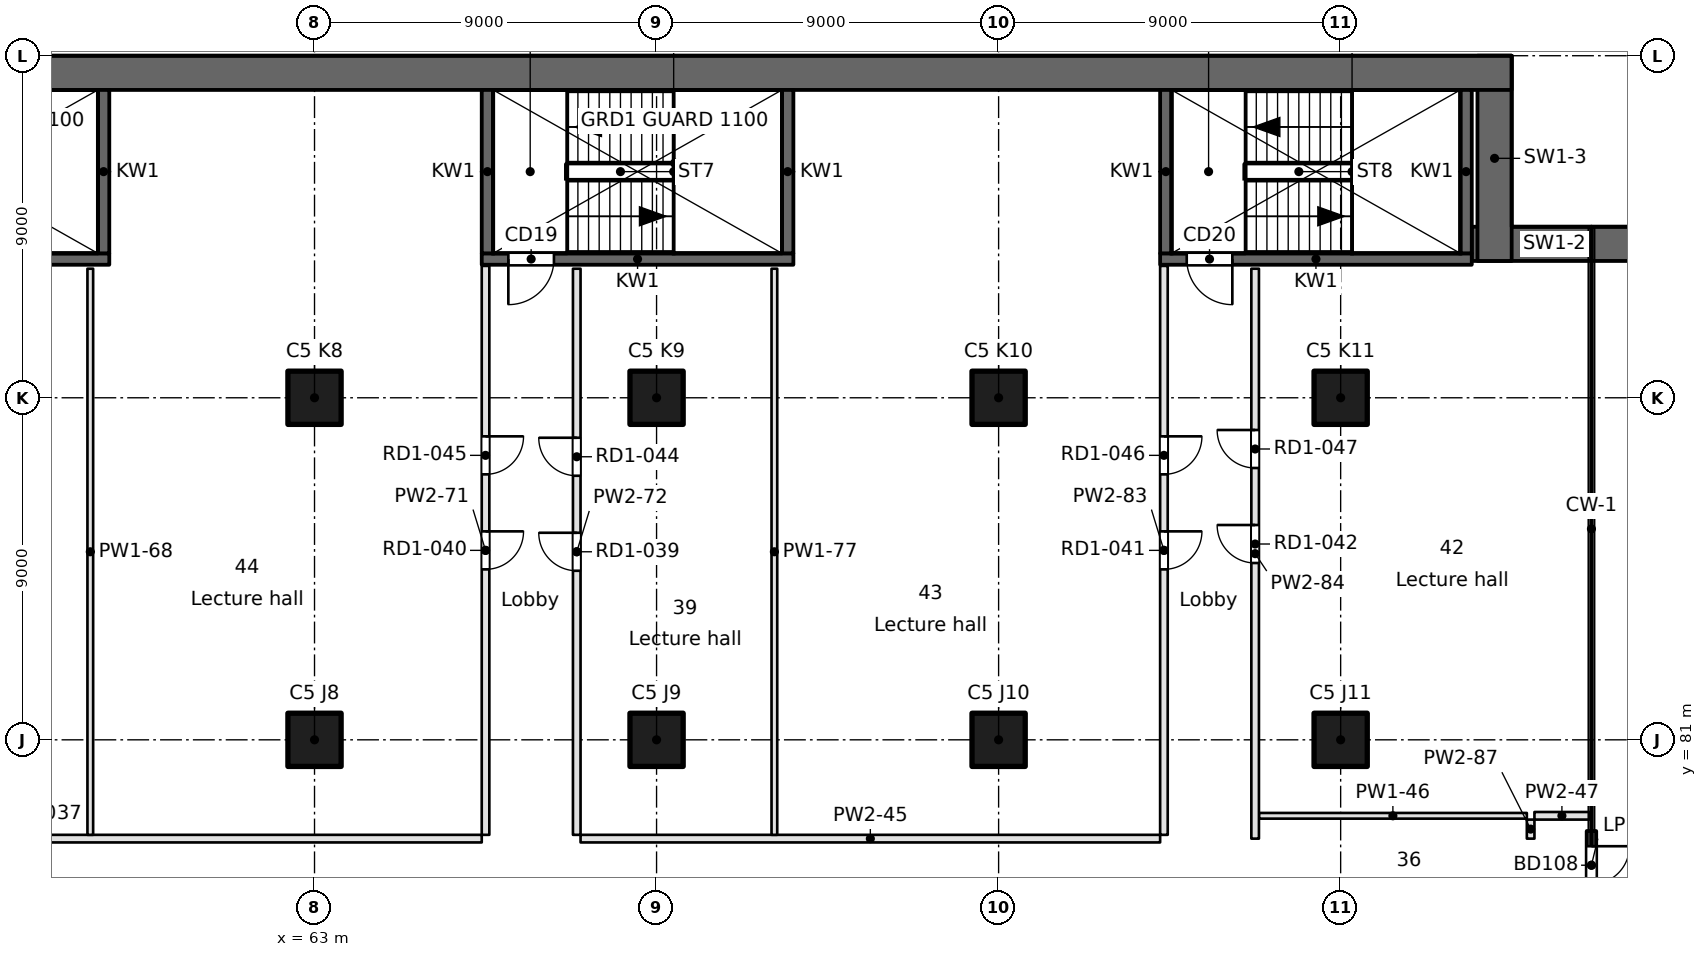
"""IFC4 building model, lengths in metres.
Left out: names, types, materials, properties, quantities, classifications, styles, units other than length and angle.
Written with IfcOpenShell. Run it as: python <this file> out.ifc"""

import sys

from ifc_helpers import new_model, si_unit, direction, frame, frame_2d, origin, origin_2d, place, context, subcontext, project, spatial, rectangle, extrude, element, fill, save


model = new_model("IFC4")
c1 = context("Model", 3, precision=1e-05, world=origin(), true_north=direction((0.0, 1.0)))
c2 = subcontext(c1, "Body", "Model", "MODEL_VIEW")
j1 = project(units=[si_unit("LENGTHUNIT", "METRE"), si_unit("PLANEANGLEUNIT", "RADIAN")], contexts=[c1])
p1 = place(None, origin())
s1 = spatial("IfcSite", under=j1, at=p1, CompositionType="ELEMENT")
p2 = place(p1, origin())
s2 = spatial("IfcBuilding", under=s1, at=p2, CompositionType="ELEMENT")
p3 = place(p2, frame((0.0, 0.0, 65.4)))
s3 = spatial("IfcBuildingStorey", under=s2, at=p3, CompositionType="ELEMENT", Elevation=65.4)
for number, where, z_axis, x_axis in (
    (1, (63.0, 81.0, 0.0), (0.0, 0.0, 1.0), (1.0, 0.0, 0.0)),
    (2, (63.0, 90.0, 0.0), (0.0, 0.0, 1.0), (1.0, 0.0, 0.0)),
    (3, (72.0, 81.0, 0.0), (0.0, 0.0, 1.0), (1.0, 0.0, 0.0)),
    (4, (72.0, 90.0, 0.0), (0.0, 0.0, 1.0), (1.0, 0.0, 0.0)),
    (5, (81.0, 81.0, 0.0), (0.0, 0.0, 1.0), (1.0, 0.0, 0.0)),
    (6, (81.0, 90.0, 0.0), (0.0, 0.0, 1.0), (1.0, 0.0, 0.0)),
    (7, (90.0, 81.0, 0.0), (0.0, 0.0, 1.0), (1.0, 0.0, 0.0)),
    (8, (90.0, 90.0, 0.0), (0.0, 0.0, 1.0), (1.0, 0.0, 0.0)),
):
    element("IfcColumn", number, at=place(p3, frame(where, z_axis=z_axis, x_axis=x_axis)), inside=s3, PredefinedType="COLUMN", context=c2, shape_type="SweptSolid", body=[
        extrude(rectangle(XDim=1.4, YDim=1.4, at=origin_2d()), origin(), (0.0, 0.0, 1.0), 3.7),
    ])
p4 = place(p3, frame((97.8, 94.05, 0.0), z_axis=(0.0, 0.0, 1.0), x_axis=(-1.0, 0.0, 0.0)))
e9 = element("IfcWall", 9, at=p4, inside=s3, PredefinedType="SHEAR", context=c2, shape_type="SweptSolid", body=[
    extrude(rectangle(XDim=4.351, YDim=0.9, at=frame_2d((2.175, 0.0))), origin(), (0.0, 0.0, 1.0), 3.7),
])
p5 = place(p3, frame((94.05, 93.6, 0.0), z_axis=(0.0, 0.0, 1.0), x_axis=(0.0, 1.0, 0.0)))
e10 = element("IfcWall", 10, at=p5, inside=s3, PredefinedType="SHEAR", context=c2, shape_type="SweptSolid", body=[
    extrude(rectangle(XDim=5.4, YDim=0.9, at=frame_2d((2.7, 0.0))), origin(), (0.0, 0.0, 1.0), 3.7),
])
p6 = place(p3, frame((94.5, 98.55, 0.0), z_axis=(0.0, 0.0, 1.0), x_axis=(-1.0, 0.0, 0.0)))
e11 = element("IfcWall", 11, at=p6, inside=s3, PredefinedType="SHEAR", context=c2, shape_type="SweptSolid", body=[
    extrude(rectangle(XDim=90.0, YDim=0.9, at=frame_2d((45.0, 0.0))), origin(), (0.0, 0.0, 1.0), 3.7),
])
p7 = place(p3, frame((96.599, 76.801, 0.0), z_axis=(0.0, 0.0, 1.0), x_axis=(0.0, 1.0, 0.0)))
e12 = element("IfcWall", 12, at=p7, inside=s3, PredefinedType="SOLIDWALL", context=c2, shape_type="SweptSolid", body=[
    extrude(rectangle(XDim=1.8, YDim=0.25, at=frame_2d((0.9, 0.0))), origin(), (0.0, 0.0, 1.0), 3.3),
])
p8 = place(p7, frame((0.4, 0.0, 0.0)))
e13 = element("IfcOpeningElement", 13, at=p8, cuts=e12, PredefinedType="OPENING", context=c2, shape_type="SweptSolid", body=[
    extrude(rectangle(XDim=1.0, YDim=2.1, at=frame_2d((0.5, 1.05))), frame((0.0, 0.125, 0.0), z_axis=(0.0, -1.0, 0.0), x_axis=(1.0, 0.0, 0.0)), (0.0, 0.0, 1.0), 0.25),
])
p9 = place(p3, frame((49.4, 93.65, -0.4), z_axis=(0.0, 0.0, 1.0), x_axis=(1.0, 0.0, 0.0)))
e14 = element("IfcWall", 14, at=p9, inside=s3, PredefinedType="SOLIDWALL", context=c2, shape_type="SweptSolid", body=[
    extrude(rectangle(XDim=8.2, YDim=0.3, at=frame_2d((4.1, 0.0))), origin(), (0.0, 0.0, 1.0), 3.7),
])
p10 = place(p9, frame((0.7, 0.0, 0.4)))
e15 = element("IfcOpeningElement", 15, at=p10, cuts=e14, PredefinedType="OPENING", context=c2, shape_type="SweptSolid", body=[
    extrude(rectangle(XDim=1.2, YDim=2.1, at=frame_2d((0.6, 1.05))), frame((0.0, 0.15, 0.0), z_axis=(0.0, -1.0, 0.0), x_axis=(1.0, 0.0, 0.0)), (0.0, 0.0, 1.0), 0.3),
])
p11 = place(p3, frame((67.4, 93.65, -0.4), z_axis=(0.0, 0.0, 1.0), x_axis=(1.0, 0.0, 0.0)))
e16 = element("IfcWall", 16, at=p11, inside=s3, PredefinedType="SOLIDWALL", context=c2, shape_type="SweptSolid", body=[
    extrude(rectangle(XDim=8.2, YDim=0.3, at=frame_2d((4.1, 0.0))), origin(), (0.0, 0.0, 1.0), 3.7),
])
p12 = place(p11, frame((0.7, 0.0, 0.4)))
e17 = element("IfcOpeningElement", 17, at=p12, cuts=e16, PredefinedType="OPENING", context=c2, shape_type="SweptSolid", body=[
    extrude(rectangle(XDim=1.2, YDim=2.1, at=frame_2d((0.6, 1.05))), frame((0.0, 0.15, 0.0), z_axis=(0.0, -1.0, 0.0), x_axis=(1.0, 0.0, 0.0)), (0.0, 0.0, 1.0), 0.3),
])
p13 = place(p3, frame((85.25, 93.65, -0.4), z_axis=(0.0, 0.0, 1.0), x_axis=(1.0, 0.0, 0.0)))
e18 = element("IfcWall", 18, at=p13, inside=s3, PredefinedType="SOLIDWALL", context=c2, shape_type="SweptSolid", body=[
    extrude(rectangle(XDim=8.2, YDim=0.3, at=frame_2d((4.1, 0.0))), origin(), (0.0, 0.0, 1.0), 3.7),
])
p14 = place(p13, frame((0.7, 0.0, 0.4)))
e19 = element("IfcOpeningElement", 19, at=p14, cuts=e18, PredefinedType="OPENING", context=c2, shape_type="SweptSolid", body=[
    extrude(rectangle(XDim=1.2, YDim=2.1, at=frame_2d((0.6, 1.05))), frame((0.0, 0.15, 0.0), z_axis=(0.0, -1.0, 0.0), x_axis=(1.0, 0.0, 0.0)), (0.0, 0.0, 1.0), 0.3),
])
for number, where, z_axis, x_axis in (
    (20, (57.45, 93.8, -0.4), (0.0, 0.0, 1.0), (0.0, 1.0, 0.0)),
    (21, (67.55, 93.8, -0.4), (0.0, 0.0, 1.0), (0.0, 1.0, 0.0)),
    (22, (75.45, 93.8, -0.4), (0.0, 0.0, 1.0), (0.0, 1.0, 0.0)),
    (23, (85.4, 93.8, -0.4), (0.0, 0.0, 1.0), (0.0, 1.0, 0.0)),
    (24, (93.3, 93.8, -0.4), (0.0, 0.0, 1.0), (0.0, 1.0, 0.0)),
):
    element("IfcWall", number, at=place(p3, frame(where, z_axis=z_axis, x_axis=x_axis)), inside=s3, PredefinedType="SOLIDWALL", context=c2, shape_type="SweptSolid", body=[
        extrude(rectangle(XDim=4.3, YDim=0.3, at=frame_2d((2.15, 0.0))), origin(), (0.0, 0.0, 1.0), 3.7),
    ])
p15 = place(p3, frame((39.1, 78.4, 0.0), z_axis=(0.0, 0.0, 1.0), x_axis=(1.0, 0.0, 0.0)))
e25 = element("IfcWall", 25, at=p15, inside=s3, PredefinedType="PARTITIONING", context=c2, shape_type="SweptSolid", body=[
    extrude(rectangle(XDim=28.3, YDim=0.2, at=frame_2d((14.15, 0.0))), origin(), (0.0, 0.0, 1.0), 3.3),
])
p16 = place(p15, frame((13.024, 0.0, 0.0)))
e26 = element("IfcOpeningElement", 26, at=p16, cuts=e25, PredefinedType="OPENING", context=c2, shape_type="SweptSolid", body=[
    extrude(rectangle(XDim=1.0, YDim=2.1, at=frame_2d((0.5, 1.05))), frame((0.0, 0.1, 0.0), z_axis=(0.0, -1.0, 0.0), x_axis=(1.0, 0.0, 0.0)), (0.0, 0.0, 1.0), 0.2),
])
p17 = place(p15, frame((15.524, 0.0, 0.0)))
e27 = element("IfcOpeningElement", 27, at=p17, cuts=e25, PredefinedType="OPENING", context=c2, shape_type="SweptSolid", body=[
    extrude(rectangle(XDim=1.0, YDim=2.1, at=frame_2d((0.5, 1.05))), frame((0.0, 0.1, 0.0), z_axis=(0.0, -1.0, 0.0), x_axis=(1.0, 0.0, 0.0)), (0.0, 0.0, 1.0), 0.2),
])
p18 = place(p3, frame((70.0, 78.4, 0.0), z_axis=(0.0, 0.0, 1.0), x_axis=(1.0, 0.0, 0.0)))
e28 = element("IfcWall", 28, at=p18, inside=s3, PredefinedType="PARTITIONING", context=c2, shape_type="SweptSolid", body=[
    extrude(rectangle(XDim=15.25, YDim=0.2, at=frame_2d((7.625, 0.0))), origin(), (0.0, 0.0, 1.0), 3.3),
])
p19 = place(p3, frame((87.85, 79.001, 0.0), z_axis=(0.0, 0.0, 1.0), x_axis=(1.0, 0.0, 0.0)))
e29 = element("IfcWall", 29, at=p19, inside=s3, PredefinedType="PARTITIONING", context=c2, shape_type="SweptSolid", body=[
    extrude(rectangle(XDim=7.049, YDim=0.15, at=frame_2d((3.524, 0.0))), origin(), (0.0, 0.0, 1.0), 3.3),
])
p20 = place(p3, frame((95.099, 79.001, 0.0), z_axis=(0.0, 0.0, 1.0), x_axis=(1.0, 0.0, 0.0)))
e30 = element("IfcWall", 30, at=p20, inside=s3, PredefinedType="PARTITIONING", context=c2, shape_type="SweptSolid", body=[
    extrude(rectangle(XDim=1.446, YDim=0.2, at=frame_2d((0.723, 0.0))), origin(), (0.0, 0.0, 1.0), 3.3),
])
p21 = place(p3, frame((57.1, 93.396, 0.0), z_axis=(0.0, 0.0, 1.0), x_axis=(0.0, -1.0, 0.0)))
e31 = element("IfcWall", 31, at=p21, inside=s3, PredefinedType="PARTITIONING", context=c2, shape_type="SweptSolid", body=[
    extrude(rectangle(XDim=14.896, YDim=0.15, at=frame_2d((7.448, 0.0))), origin(), (0.0, 0.0, 1.0), 3.3),
])
p22 = place(p3, frame((67.5, 78.5, 0.0), z_axis=(0.0, 0.0, 1.0), x_axis=(0.0, 1.0, 0.0)))
e32 = element("IfcWall", 32, at=p22, inside=s3, PredefinedType="PARTITIONING", context=c2, shape_type="SweptSolid", body=[
    extrude(rectangle(XDim=14.97, YDim=0.2, at=frame_2d((7.485, 0.0))), origin(), (0.0, 0.0, 1.0), 3.3),
])
p23 = place(p22, frame((6.985, 0.0, 0.0)))
e33 = element("IfcOpeningElement", 33, at=p23, cuts=e32, PredefinedType="OPENING", context=c2, shape_type="SweptSolid", body=[
    extrude(rectangle(XDim=1.0, YDim=2.1, at=frame_2d((0.5, 1.05))), frame((0.0, 0.1, 0.0), z_axis=(0.0, -1.0, 0.0), x_axis=(1.0, 0.0, 0.0)), (0.0, 0.0, 1.0), 0.2),
])
p24 = place(p22, frame((9.485, 0.0, 0.0)))
e34 = element("IfcOpeningElement", 34, at=p24, cuts=e32, PredefinedType="OPENING", context=c2, shape_type="SweptSolid", body=[
    extrude(rectangle(XDim=1.0, YDim=2.1, at=frame_2d((0.5, 1.05))), frame((0.0, 0.1, 0.0), z_axis=(0.0, -1.0, 0.0), x_axis=(1.0, 0.0, 0.0)), (0.0, 0.0, 1.0), 0.2),
])
p25 = place(p3, frame((69.9, 93.396, 0.0), z_axis=(0.0, 0.0, 1.0), x_axis=(0.0, -1.0, 0.0)))
e35 = element("IfcWall", 35, at=p25, inside=s3, PredefinedType="PARTITIONING", context=c2, shape_type="SweptSolid", body=[
    extrude(rectangle(XDim=14.896, YDim=0.2, at=frame_2d((7.448, 0.0))), origin(), (0.0, 0.0, 1.0), 3.3),
])
p26 = place(p25, frame((6.948, 0.0, 0.0)))
e36 = element("IfcOpeningElement", 36, at=p26, cuts=e35, PredefinedType="OPENING", context=c2, shape_type="SweptSolid", body=[
    extrude(rectangle(XDim=1.0, YDim=2.1, at=frame_2d((0.5, 1.05))), frame((0.0, 0.1, 0.0), z_axis=(0.0, -1.0, 0.0), x_axis=(1.0, 0.0, 0.0)), (0.0, 0.0, 1.0), 0.2),
])
p27 = place(p25, frame((4.448, 0.0, 0.0)))
e37 = element("IfcOpeningElement", 37, at=p27, cuts=e35, PredefinedType="OPENING", context=c2, shape_type="SweptSolid", body=[
    extrude(rectangle(XDim=1.0, YDim=2.1, at=frame_2d((0.5, 1.05))), frame((0.0, 0.1, 0.0), z_axis=(0.0, -1.0, 0.0), x_axis=(1.0, 0.0, 0.0)), (0.0, 0.0, 1.0), 0.2),
])
p28 = place(p3, frame((75.1, 93.396, 0.0), z_axis=(0.0, 0.0, 1.0), x_axis=(0.0, -1.0, 0.0)))
e38 = element("IfcWall", 38, at=p28, inside=s3, PredefinedType="PARTITIONING", context=c2, shape_type="SweptSolid", body=[
    extrude(rectangle(XDim=14.896, YDim=0.15, at=frame_2d((7.448, 0.0))), origin(), (0.0, 0.0, 1.0), 3.3),
])
p29 = place(p3, frame((85.35, 78.5, 0.0), z_axis=(0.0, 0.0, 1.0), x_axis=(0.0, 1.0, 0.0)))
e39 = element("IfcWall", 39, at=p29, inside=s3, PredefinedType="PARTITIONING", context=c2, shape_type="SweptSolid", body=[
    extrude(rectangle(XDim=14.97, YDim=0.2, at=frame_2d((7.485, 0.0))), origin(), (0.0, 0.0, 1.0), 3.3),
])
p30 = place(p29, frame((6.985, 0.0, 0.0)))
e40 = element("IfcOpeningElement", 40, at=p30, cuts=e39, PredefinedType="OPENING", context=c2, shape_type="SweptSolid", body=[
    extrude(rectangle(XDim=1.0, YDim=2.1, at=frame_2d((0.5, 1.05))), frame((0.0, 0.1, 0.0), z_axis=(0.0, -1.0, 0.0), x_axis=(1.0, 0.0, 0.0)), (0.0, 0.0, 1.0), 0.2),
])
p31 = place(p29, frame((9.485, 0.0, 0.0)))
e41 = element("IfcOpeningElement", 41, at=p31, cuts=e39, PredefinedType="OPENING", context=c2, shape_type="SweptSolid", body=[
    extrude(rectangle(XDim=1.0, YDim=2.1, at=frame_2d((0.5, 1.05))), frame((0.0, 0.1, 0.0), z_axis=(0.0, -1.0, 0.0), x_axis=(1.0, 0.0, 0.0)), (0.0, 0.0, 1.0), 0.2),
])
p32 = place(p3, frame((87.75, 93.396, 0.0), z_axis=(0.0, 0.0, 1.0), x_axis=(0.0, -1.0, 0.0)))
e42 = element("IfcWall", 42, at=p32, inside=s3, PredefinedType="PARTITIONING", context=c2, shape_type="SweptSolid", body=[
    extrude(rectangle(XDim=14.996, YDim=0.2, at=frame_2d((7.498, 0.0))), origin(), (0.0, 0.0, 1.0), 3.3),
])
p33 = place(p32, frame((6.744, 0.0, 0.0)))
e43 = element("IfcOpeningElement", 43, at=p33, cuts=e42, PredefinedType="OPENING", context=c2, shape_type="SweptSolid", body=[
    extrude(rectangle(XDim=1.0, YDim=2.1, at=frame_2d((0.5, 1.05))), frame((0.0, 0.1, 0.0), z_axis=(0.0, -1.0, 0.0), x_axis=(1.0, 0.0, 0.0)), (0.0, 0.0, 1.0), 0.2),
])
p34 = place(p32, frame((4.244, 0.0, 0.0)))
e44 = element("IfcOpeningElement", 44, at=p34, cuts=e42, PredefinedType="OPENING", context=c2, shape_type="SweptSolid", body=[
    extrude(rectangle(XDim=1.0, YDim=2.1, at=frame_2d((0.5, 1.05))), frame((0.0, 0.1, 0.0), z_axis=(0.0, -1.0, 0.0), x_axis=(1.0, 0.0, 0.0)), (0.0, 0.0, 1.0), 0.2),
])
p35 = place(p3, frame((94.999, 78.4, 0.0), z_axis=(0.0, 0.0, 1.0), x_axis=(0.0, 1.0, 0.0)))
e45 = element("IfcWall", 45, at=p35, inside=s3, PredefinedType="PARTITIONING", context=c2, shape_type="SweptSolid", body=[
    extrude(rectangle(XDim=0.501, YDim=0.2, at=frame_2d((0.25, 0.0))), origin(), (0.0, 0.0, 1.0), 3.3),
])
p36 = place(p8, frame((1.0, 0.0, 0.0), z_axis=(0.0, 0.0, 1.0), x_axis=(-1.0, 0.0, 0.0)))
e46 = element("IfcDoor", 46, at=p36, inside=s3, OperationType="SINGLE_SWING_LEFT", PredefinedType="DOOR", context=c2, shape_type="SweptSolid", body=[
    extrude(rectangle(XDim=1.0, YDim=2.1, at=frame_2d((0.5, 1.05))), frame((0.0, 0.025, 0.0), z_axis=(0.0, -1.0, 0.0), x_axis=(1.0, 0.0, 0.0)), (0.0, 0.0, 1.0), 0.05),
])
fill(e13, e46)
p37 = place(p12, frame((1.2, 0.0, 0.0), z_axis=(0.0, 0.0, 1.0), x_axis=(-1.0, 0.0, 0.0)))
e47 = element("IfcDoor", 47, at=p37, inside=s3, OperationType="SINGLE_SWING_RIGHT", PredefinedType="DOOR", context=c2, shape_type="SweptSolid", body=[
    extrude(rectangle(XDim=1.2, YDim=2.1, at=frame_2d((0.6, 1.05))), frame((0.0, 0.025, 0.0), z_axis=(0.0, -1.0, 0.0), x_axis=(1.0, 0.0, 0.0)), (0.0, 0.0, 1.0), 0.05),
])
fill(e17, e47)
p38 = place(p14, frame((1.2, 0.0, 0.0), z_axis=(0.0, 0.0, 1.0), x_axis=(-1.0, 0.0, 0.0)))
e48 = element("IfcDoor", 48, at=p38, inside=s3, OperationType="SINGLE_SWING_LEFT", PredefinedType="DOOR", context=c2, shape_type="SweptSolid", body=[
    extrude(rectangle(XDim=1.2, YDim=2.1, at=frame_2d((0.6, 1.05))), frame((0.0, 0.025, 0.0), z_axis=(0.0, -1.0, 0.0), x_axis=(1.0, 0.0, 0.0)), (0.0, 0.0, 1.0), 0.05),
])
fill(e19, e48)
p39 = place(p26, frame((1.0, 0.0, 0.0), z_axis=(0.0, 0.0, 1.0), x_axis=(-1.0, 0.0, 0.0)))
e49 = element("IfcDoor", 49, at=p39, inside=s3, OperationType="SINGLE_SWING_RIGHT", PredefinedType="DOOR", context=c2, shape_type="SweptSolid", body=[
    extrude(rectangle(XDim=1.0, YDim=2.1, at=frame_2d((0.5, 1.05))), frame((0.0, 0.025, 0.0), z_axis=(0.0, -1.0, 0.0), x_axis=(1.0, 0.0, 0.0)), (0.0, 0.0, 1.0), 0.05),
])
fill(e36, e49)
p40 = place(p23, frame((1.0, 0.0, 0.0), z_axis=(0.0, 0.0, 1.0), x_axis=(-1.0, 0.0, 0.0)))
e50 = element("IfcDoor", 50, at=p40, inside=s3, OperationType="SINGLE_SWING_LEFT", PredefinedType="DOOR", context=c2, shape_type="SweptSolid", body=[
    extrude(rectangle(XDim=1.0, YDim=2.1, at=frame_2d((0.5, 1.05))), frame((0.0, 0.025, 0.0), z_axis=(0.0, -1.0, 0.0), x_axis=(1.0, 0.0, 0.0)), (0.0, 0.0, 1.0), 0.05),
])
fill(e33, e50)
p41 = place(p30, frame((1.0, 0.0, 0.0), z_axis=(0.0, 0.0, 1.0), x_axis=(-1.0, 0.0, 0.0)))
e51 = element("IfcDoor", 51, at=p41, inside=s3, OperationType="SINGLE_SWING_LEFT", PredefinedType="DOOR", context=c2, shape_type="SweptSolid", body=[
    extrude(rectangle(XDim=1.0, YDim=2.1, at=frame_2d((0.5, 1.05))), frame((0.0, 0.025, 0.0), z_axis=(0.0, -1.0, 0.0), x_axis=(1.0, 0.0, 0.0)), (0.0, 0.0, 1.0), 0.05),
])
fill(e40, e51)
p42 = place(p33, frame((1.0, 0.0, 0.0), z_axis=(0.0, 0.0, 1.0), x_axis=(-1.0, 0.0, 0.0)))
e52 = element("IfcDoor", 52, at=p42, inside=s3, OperationType="SINGLE_SWING_RIGHT", PredefinedType="DOOR", context=c2, shape_type="SweptSolid", body=[
    extrude(rectangle(XDim=1.0, YDim=2.1, at=frame_2d((0.5, 1.05))), frame((0.0, 0.025, 0.0), z_axis=(0.0, -1.0, 0.0), x_axis=(1.0, 0.0, 0.0)), (0.0, 0.0, 1.0), 0.05),
])
fill(e43, e52)
p43 = place(p27, frame((1.0, 0.0, 0.0), z_axis=(0.0, 0.0, 1.0), x_axis=(-1.0, 0.0, 0.0)))
e53 = element("IfcDoor", 53, at=p43, inside=s3, OperationType="SINGLE_SWING_RIGHT", PredefinedType="DOOR", context=c2, shape_type="SweptSolid", body=[
    extrude(rectangle(XDim=1.0, YDim=2.1, at=frame_2d((0.5, 1.05))), frame((0.0, 0.025, 0.0), z_axis=(0.0, -1.0, 0.0), x_axis=(1.0, 0.0, 0.0)), (0.0, 0.0, 1.0), 0.05),
])
fill(e37, e53)
p44 = place(p24, frame((1.0, 0.0, 0.0), z_axis=(0.0, 0.0, 1.0), x_axis=(-1.0, 0.0, 0.0)))
e54 = element("IfcDoor", 54, at=p44, inside=s3, OperationType="SINGLE_SWING_LEFT", PredefinedType="DOOR", context=c2, shape_type="SweptSolid", body=[
    extrude(rectangle(XDim=1.0, YDim=2.1, at=frame_2d((0.5, 1.05))), frame((0.0, 0.025, 0.0), z_axis=(0.0, -1.0, 0.0), x_axis=(1.0, 0.0, 0.0)), (0.0, 0.0, 1.0), 0.05),
])
fill(e34, e54)
p45 = place(p31, frame((1.0, 0.0, 0.0), z_axis=(0.0, 0.0, 1.0), x_axis=(-1.0, 0.0, 0.0)))
e55 = element("IfcDoor", 55, at=p45, inside=s3, OperationType="SINGLE_SWING_LEFT", PredefinedType="DOOR", context=c2, shape_type="SweptSolid", body=[
    extrude(rectangle(XDim=1.0, YDim=2.1, at=frame_2d((0.5, 1.05))), frame((0.0, 0.025, 0.0), z_axis=(0.0, -1.0, 0.0), x_axis=(1.0, 0.0, 0.0)), (0.0, 0.0, 1.0), 0.05),
])
fill(e41, e55)
p46 = place(p34, frame((1.0, 0.0, 0.0), z_axis=(0.0, 0.0, 1.0), x_axis=(-1.0, 0.0, 0.0)))
e56 = element("IfcDoor", 56, at=p46, inside=s3, OperationType="SINGLE_SWING_RIGHT", PredefinedType="DOOR", context=c2, shape_type="SweptSolid", body=[
    extrude(rectangle(XDim=1.0, YDim=2.1, at=frame_2d((0.5, 1.05))), frame((0.0, 0.025, 0.0), z_axis=(0.0, -1.0, 0.0), x_axis=(1.0, 0.0, 0.0)), (0.0, 0.0, 1.0), 0.05),
])
fill(e44, e56)
save(model, sys.argv[1])
